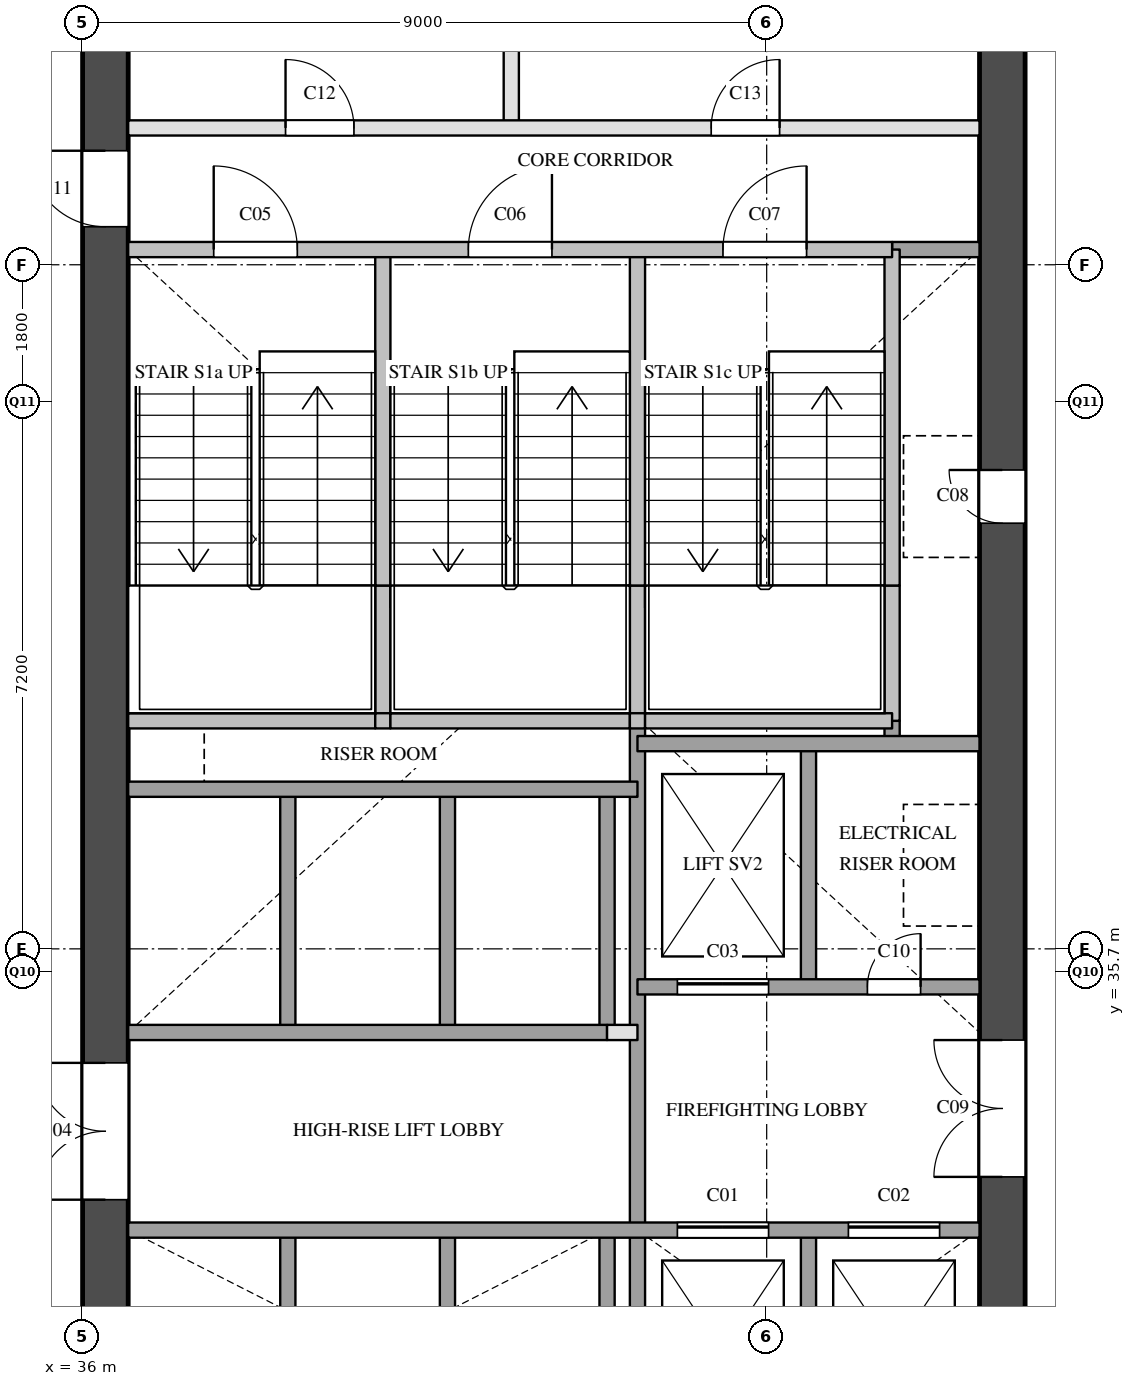
"""IFC4 building model, lengths in metres.
Left out: names, types, materials, properties, quantities, classifications, styles, units other than length and angle.
Written with IfcOpenShell. Run it as: python <this file> out.ifc"""

import sys

from ifc_helpers import new_model, si_unit, direction, frame, frame_2d, origin, place, context, subcontext, project, spatial, rectangle, extrude, element, fill, save


model = new_model("IFC4")
c1 = context("Model", 3, precision=1e-05, world=origin(), true_north=direction((0.0, 1.0)))
c2 = subcontext(c1, "Body", "Model", "MODEL_VIEW")
j1 = project(units=[si_unit("LENGTHUNIT", "METRE"), si_unit("PLANEANGLEUNIT", "RADIAN")], contexts=[c1])
p1 = place(None, origin())
s1 = spatial("IfcSite", under=j1, at=p1, CompositionType="ELEMENT")
p2 = place(p1, origin())
s2 = spatial("IfcBuilding", under=s1, at=p2, CompositionType="ELEMENT")
p3 = place(p2, frame((0.0, 0.0, 65.2)))
s3 = spatial("IfcBuildingStorey", under=s2, at=p3, CompositionType="ELEMENT", Elevation=65.2)
p4 = place(p3, frame((36.3, 29.1, 0.0), z_axis=(0.0, 0.0, 1.0), x_axis=(0.0, 1.0, 0.0)))
e1 = element("IfcWall", 1, at=p4, inside=s3, PredefinedType="SHEAR", context=c2, shape_type="SweptSolid", body=[
    extrude(rectangle(XDim=20.3, YDim=0.6, at=frame_2d((10.15, 0.0))), origin(), (0.0, 0.0, 1.0), 3.5),
])
p5 = place(p4, frame((3.6, 0.0, 0.0)))
e2 = element("IfcOpeningElement", 2, at=p5, cuts=e1, PredefinedType="OPENING", context=c2, shape_type="SweptSolid", body=[
    extrude(rectangle(XDim=1.8, YDim=2.1, at=frame_2d((0.9, 1.05))), frame((0.0, 0.31, 0.0), z_axis=(0.0, -1.0, 0.0), x_axis=(1.0, 0.0, 0.0)), (0.0, 0.0, 1.0), 0.62),
])
p6 = place(p4, frame((16.4, 0.0, 0.0)))
e3 = element("IfcOpeningElement", 3, at=p6, cuts=e1, PredefinedType="OPENING", context=c2, shape_type="SweptSolid", body=[
    extrude(rectangle(XDim=1.0, YDim=2.1, at=frame_2d((0.5, 1.05))), frame((0.0, 0.31, 0.0), z_axis=(0.0, -1.0, 0.0), x_axis=(1.0, 0.0, 0.0)), (0.0, 0.0, 1.0), 0.62),
])
p7 = place(p3, frame((48.1, 29.1, 0.0), z_axis=(0.0, 0.0, 1.0), x_axis=(0.0, 1.0, 0.0)))
e4 = element("IfcWall", 4, at=p7, inside=s3, PredefinedType="SHEAR", context=c2, shape_type="SweptSolid", body=[
    extrude(rectangle(XDim=20.3, YDim=0.6, at=frame_2d((10.15, 0.0))), origin(), (0.0, 0.0, 1.0), 3.5),
])
p8 = place(p7, frame((12.5, 0.0, 0.0)))
e5 = element("IfcOpeningElement", 5, at=p8, cuts=e4, PredefinedType="OPENING", context=c2, shape_type="SweptSolid", body=[
    extrude(rectangle(XDim=0.7, YDim=2.1, at=frame_2d((0.35, 1.05))), frame((0.0, 0.31, 0.0), z_axis=(0.0, -1.0, 0.0), x_axis=(1.0, 0.0, 0.0)), (0.0, 0.0, 1.0), 0.62),
])
p9 = place(p7, frame((3.9, 0.0, 0.0)))
e6 = element("IfcOpeningElement", 6, at=p9, cuts=e4, PredefinedType="OPENING", context=c2, shape_type="SweptSolid", body=[
    extrude(rectangle(XDim=1.8, YDim=2.1, at=frame_2d((0.9, 1.05))), frame((0.0, 0.31, 0.0), z_axis=(0.0, -1.0, 0.0), x_axis=(1.0, 0.0, 0.0)), (0.0, 0.0, 1.0), 0.62),
])
p10 = place(p3, frame((38.7, 29.1, 0.0), z_axis=(0.0, 0.0, 1.0), x_axis=(0.0, 1.0, 0.0)))
e7 = element("IfcWall", 7, at=p10, inside=s3, PredefinedType="SOLIDWALL", context=c2, shape_type="SweptSolid", body=[
    extrude(rectangle(XDim=3.2, YDim=0.2, at=frame_2d((1.6, 0.0))), origin(), (0.0, 0.0, 1.0), 3.5),
])
p11 = place(p3, frame((38.7, 34.9, 0.0), z_axis=(0.0, 0.0, 1.0), x_axis=(0.0, 1.0, 0.0)))
e8 = element("IfcWall", 8, at=p11, inside=s3, PredefinedType="SOLIDWALL", context=c2, shape_type="SweptSolid", body=[
    extrude(rectangle(XDim=3.2, YDim=0.2, at=frame_2d((1.6, 0.0))), origin(), (0.0, 0.0, 1.0), 3.5),
])
p12 = place(p3, frame((39.95, 39.0, 0.0), z_axis=(0.0, 0.0, 1.0), x_axis=(0.0, 1.0, 0.0)))
e9 = element("IfcWall", 9, at=p12, inside=s3, PredefinedType="SOLIDWALL", context=c2, shape_type="SweptSolid", body=[
    extrude(rectangle(XDim=1.78, YDim=0.2, at=frame_2d((0.89, 0.0))), origin(), (0.0, 0.0, 1.0), 3.5),
])
p13 = place(p3, frame((39.95, 40.78, 0.0), z_axis=(0.0, 0.0, 1.0), x_axis=(0.0, 1.0, 0.0)))
e10 = element("IfcWall", 10, at=p13, inside=s3, PredefinedType="SOLIDWALL", context=c2, shape_type="SweptSolid", body=[
    extrude(rectangle(XDim=4.42, YDim=0.2, at=frame_2d((2.21, 0.0))), origin(), (0.0, 0.0, 1.0), 3.5),
])
p14 = place(p3, frame((40.8, 29.1, 0.0), z_axis=(0.0, 0.0, 1.0), x_axis=(0.0, 1.0, 0.0)))
e11 = element("IfcWall", 11, at=p14, inside=s3, PredefinedType="SOLIDWALL", context=c2, shape_type="SweptSolid", body=[
    extrude(rectangle(XDim=3.2, YDim=0.2, at=frame_2d((1.6, 0.0))), origin(), (0.0, 0.0, 1.0), 3.5),
])
p15 = place(p3, frame((40.8, 34.9, 0.0), z_axis=(0.0, 0.0, 1.0), x_axis=(0.0, 1.0, 0.0)))
e12 = element("IfcWall", 12, at=p15, inside=s3, PredefinedType="SOLIDWALL", context=c2, shape_type="SweptSolid", body=[
    extrude(rectangle(XDim=3.2, YDim=0.2, at=frame_2d((1.6, 0.0))), origin(), (0.0, 0.0, 1.0), 3.5),
])
p16 = place(p3, frame((41.64, 46.8, 0.0), z_axis=(0.0, 0.0, 1.0), x_axis=(0.0, 1.0, 0.0)))
e13 = element("IfcWall", 13, at=p16, inside=s3, PredefinedType="PARTITIONING", context=c2, shape_type="SweptSolid", body=[
    extrude(rectangle(XDim=2.2, YDim=0.2, at=frame_2d((1.1, 0.0))), origin(), (0.0, 0.0, 1.0), 3.5),
])
p17 = place(p3, frame((42.9, 29.1, 0.0), z_axis=(0.0, 0.0, 1.0), x_axis=(0.0, 1.0, 0.0)))
e14 = element("IfcWall", 14, at=p17, inside=s3, PredefinedType="SOLIDWALL", context=c2, shape_type="SweptSolid", body=[
    extrude(rectangle(XDim=3.2, YDim=0.2, at=frame_2d((1.6, 0.0))), origin(), (0.0, 0.0, 1.0), 3.5),
])
p18 = place(p3, frame((42.9, 34.9, 0.0), z_axis=(0.0, 0.0, 1.0), x_axis=(0.0, 1.0, 0.0)))
e15 = element("IfcWall", 15, at=p18, inside=s3, PredefinedType="SOLIDWALL", context=c2, shape_type="SweptSolid", body=[
    extrude(rectangle(XDim=3.2, YDim=0.2, at=frame_2d((1.6, 0.0))), origin(), (0.0, 0.0, 1.0), 3.5),
])
p19 = place(p3, frame((43.3, 29.1, 0.0), z_axis=(0.0, 0.0, 1.0), x_axis=(0.0, 1.0, 0.0)))
e16 = element("IfcWall", 16, at=p19, inside=s3, PredefinedType="SOLIDWALL", context=c2, shape_type="SweptSolid", body=[
    extrude(rectangle(XDim=9.9, YDim=0.2, at=frame_2d((4.95, 0.0))), origin(), (0.0, 0.0, 1.0), 3.5),
])
p20 = place(p3, frame((43.3, 39.0, 0.0), z_axis=(0.0, 0.0, 1.0), x_axis=(0.0, 1.0, 0.0)))
e17 = element("IfcWall", 17, at=p20, inside=s3, PredefinedType="SOLIDWALL", context=c2, shape_type="SweptSolid", body=[
    extrude(rectangle(XDim=1.78, YDim=0.2, at=frame_2d((0.89, 0.0))), origin(), (0.0, 0.0, 1.0), 3.5),
])
p21 = place(p3, frame((43.3, 40.78, 0.0), z_axis=(0.0, 0.0, 1.0), x_axis=(0.0, 1.0, 0.0)))
e18 = element("IfcWall", 18, at=p21, inside=s3, PredefinedType="SOLIDWALL", context=c2, shape_type="SweptSolid", body=[
    extrude(rectangle(XDim=4.42, YDim=0.2, at=frame_2d((2.21, 0.0))), origin(), (0.0, 0.0, 1.0), 3.5),
])
for number, where, z_axis, x_axis in (
    (19, (45.55, 29.1, 0.0), (0.0, 0.0, 1.0), (0.0, 1.0, 0.0)),
    (20, (45.55, 35.5, 0.0), (0.0, 0.0, 1.0), (0.0, 1.0, 0.0)),
):
    element("IfcWall", number, at=place(p3, frame(where, z_axis=z_axis, x_axis=x_axis)), inside=s3, PredefinedType="SOLIDWALL", context=c2, shape_type="SweptSolid", body=[
        extrude(rectangle(XDim=3.2, YDim=0.2, at=frame_2d((1.6, 0.0))), origin(), (0.0, 0.0, 1.0), 3.5),
    ])
p22 = place(p3, frame((46.65, 38.7, 0.0), z_axis=(0.0, 0.0, 1.0), x_axis=(0.0, 1.0, 0.0)))
e21 = element("IfcWall", 21, at=p22, inside=s3, PredefinedType="SOLIDWALL", context=c2, shape_type="SweptSolid", body=[
    extrude(rectangle(XDim=0.3, YDim=0.2, at=frame_2d((0.15, 0.0))), origin(), (0.0, 0.0, 1.0), 3.5),
])
p23 = place(p3, frame((46.65, 39.0, 0.0), z_axis=(0.0, 0.0, 1.0), x_axis=(0.0, 1.0, 0.0)))
e22 = element("IfcWall", 22, at=p23, inside=s3, PredefinedType="SOLIDWALL", context=c2, shape_type="SweptSolid", body=[
    extrude(rectangle(XDim=1.78, YDim=0.2, at=frame_2d((0.89, 0.0))), origin(), (0.0, 0.0, 1.0), 3.5),
])
p24 = place(p3, frame((46.65, 40.78, 0.0), z_axis=(0.0, 0.0, 1.0), x_axis=(0.0, 1.0, 0.0)))
e23 = element("IfcWall", 23, at=p24, inside=s3, PredefinedType="SOLIDWALL", context=c2, shape_type="SweptSolid", body=[
    extrude(rectangle(XDim=4.42, YDim=0.2, at=frame_2d((2.21, 0.0))), origin(), (0.0, 0.0, 1.0), 3.5),
])
p25 = place(p3, frame((36.6, 32.3, 0.0), z_axis=(0.0, 0.0, 1.0), x_axis=(1.0, 0.0, 0.0)))
e24 = element("IfcWall", 24, at=p25, inside=s3, PredefinedType="SOLIDWALL", context=c2, shape_type="SweptSolid", body=[
    extrude(rectangle(XDim=11.2, YDim=0.2, at=frame_2d((5.6, 0.0))), origin(), (0.0, 0.0, 1.0), 3.5),
])
p26 = place(p25, frame((7.225, 0.0, 0.0)))
e25 = element("IfcOpeningElement", 25, at=p26, cuts=e24, PredefinedType="OPENING", context=c2, shape_type="SweptSolid", body=[
    extrude(rectangle(XDim=1.2, YDim=2.1, at=frame_2d((0.6, 1.05))), frame((0.0, 0.11, 0.0), z_axis=(0.0, -1.0, 0.0), x_axis=(1.0, 0.0, 0.0)), (0.0, 0.0, 1.0), 0.22),
])
p27 = place(p25, frame((9.475, 0.0, 0.0)))
e26 = element("IfcOpeningElement", 26, at=p27, cuts=e24, PredefinedType="OPENING", context=c2, shape_type="SweptSolid", body=[
    extrude(rectangle(XDim=1.2, YDim=2.1, at=frame_2d((0.6, 1.05))), frame((0.0, 0.11, 0.0), z_axis=(0.0, -1.0, 0.0), x_axis=(1.0, 0.0, 0.0)), (0.0, 0.0, 1.0), 0.22),
])
p28 = place(p3, frame((42.9, 34.9, 0.0), z_axis=(0.0, 0.0, 1.0), x_axis=(1.0, 0.0, 0.0)))
e27 = element("IfcWall", 27, at=p28, inside=s3, PredefinedType="PARTITIONING", context=c2, shape_type="SweptSolid", body=[
    extrude(rectangle(XDim=0.4, YDim=0.2, at=frame_2d((0.2, 0.0))), origin(), (0.0, 0.0, 1.0), 3.5),
])
p29 = place(p3, frame((36.6, 34.9, 0.0), z_axis=(0.0, 0.0, 1.0), x_axis=(1.0, 0.0, 0.0)))
e28 = element("IfcWall", 28, at=p29, inside=s3, PredefinedType="SOLIDWALL", context=c2, shape_type="SweptSolid", body=[
    extrude(rectangle(XDim=6.3, YDim=0.2, at=frame_2d((3.15, 0.0))), origin(), (0.0, 0.0, 1.0), 3.5),
])
p30 = place(p3, frame((43.3, 35.5, 0.0), z_axis=(0.0, 0.0, 1.0), x_axis=(1.0, 0.0, 0.0)))
e29 = element("IfcWall", 29, at=p30, inside=s3, PredefinedType="SOLIDWALL", context=c2, shape_type="SweptSolid", body=[
    extrude(rectangle(XDim=4.5, YDim=0.2, at=frame_2d((2.25, 0.0))), origin(), (0.0, 0.0, 1.0), 3.5),
])
p31 = place(p30, frame((0.525, 0.0, 0.0)))
e30 = element("IfcOpeningElement", 30, at=p31, cuts=e29, PredefinedType="OPENING", context=c2, shape_type="SweptSolid", body=[
    extrude(rectangle(XDim=1.2, YDim=2.1, at=frame_2d((0.6, 1.05))), frame((0.0, 0.11, 0.0), z_axis=(0.0, -1.0, 0.0), x_axis=(1.0, 0.0, 0.0)), (0.0, 0.0, 1.0), 0.22),
])
p32 = place(p30, frame((3.025, 0.0, 0.0)))
e31 = element("IfcOpeningElement", 31, at=p32, cuts=e29, PredefinedType="OPENING", context=c2, shape_type="SweptSolid", body=[
    extrude(rectangle(XDim=0.7, YDim=2.1, at=frame_2d((0.35, 1.05))), frame((0.0, 0.11, 0.0), z_axis=(0.0, -1.0, 0.0), x_axis=(1.0, 0.0, 0.0)), (0.0, 0.0, 1.0), 0.22),
])
p33 = place(p3, frame((36.6, 38.1, 0.0), z_axis=(0.0, 0.0, 1.0), x_axis=(1.0, 0.0, 0.0)))
e32 = element("IfcWall", 32, at=p33, inside=s3, PredefinedType="SOLIDWALL", context=c2, shape_type="SweptSolid", body=[
    extrude(rectangle(XDim=6.7, YDim=0.2, at=frame_2d((3.35, 0.0))), origin(), (0.0, 0.0, 1.0), 3.5),
])
p34 = place(p3, frame((43.3, 38.7, 0.0), z_axis=(0.0, 0.0, 1.0), x_axis=(1.0, 0.0, 0.0)))
e33 = element("IfcWall", 33, at=p34, inside=s3, PredefinedType="SOLIDWALL", context=c2, shape_type="SweptSolid", body=[
    extrude(rectangle(XDim=4.5, YDim=0.2, at=frame_2d((2.25, 0.0))), origin(), (0.0, 0.0, 1.0), 3.5),
])
p35 = place(p3, frame((36.6, 39.0, 0.0), z_axis=(0.0, 0.0, 1.0), x_axis=(1.0, 0.0, 0.0)))
e34 = element("IfcWall", 34, at=p35, inside=s3, PredefinedType="SOLIDWALL", context=c2, shape_type="SweptSolid", body=[
    extrude(rectangle(XDim=3.25, YDim=0.2, at=frame_2d((1.625, 0.0))), origin(), (0.0, 0.0, 1.0), 3.5),
])
p36 = place(p3, frame((39.85, 39.0, 0.0), z_axis=(0.0, 0.0, 1.0), x_axis=(1.0, 0.0, 0.0)))
e35 = element("IfcWall", 35, at=p36, inside=s3, PredefinedType="SOLIDWALL", context=c2, shape_type="SweptSolid", body=[
    extrude(rectangle(XDim=0.2, YDim=0.2, at=frame_2d((0.1, 0.0))), origin(), (0.0, 0.0, 1.0), 3.5),
])
p37 = place(p3, frame((40.05, 39.0, 0.0), z_axis=(0.0, 0.0, 1.0), x_axis=(1.0, 0.0, 0.0)))
e36 = element("IfcWall", 36, at=p37, inside=s3, PredefinedType="SOLIDWALL", context=c2, shape_type="SweptSolid", body=[
    extrude(rectangle(XDim=3.15, YDim=0.2, at=frame_2d((1.575, 0.0))), origin(), (0.0, 0.0, 1.0), 3.5),
])
p38 = place(p3, frame((43.2, 39.0, 0.0), z_axis=(0.0, 0.0, 1.0), x_axis=(1.0, 0.0, 0.0)))
e37 = element("IfcWall", 37, at=p38, inside=s3, PredefinedType="SOLIDWALL", context=c2, shape_type="SweptSolid", body=[
    extrude(rectangle(XDim=0.2, YDim=0.2, at=frame_2d((0.1, 0.0))), origin(), (0.0, 0.0, 1.0), 3.5),
])
p39 = place(p3, frame((43.4, 39.0, 0.0), z_axis=(0.0, 0.0, 1.0), x_axis=(1.0, 0.0, 0.0)))
e38 = element("IfcWall", 38, at=p39, inside=s3, PredefinedType="SOLIDWALL", context=c2, shape_type="SweptSolid", body=[
    extrude(rectangle(XDim=3.25, YDim=0.2, at=frame_2d((1.625, 0.0))), origin(), (0.0, 0.0, 1.0), 3.5),
])
p40 = place(p3, frame((46.65, 45.2, 0.0), z_axis=(0.0, 0.0, 1.0), x_axis=(1.0, 0.0, 0.0)))
e39 = element("IfcWall", 39, at=p40, inside=s3, PredefinedType="SOLIDWALL", context=c2, shape_type="SweptSolid", body=[
    extrude(rectangle(XDim=1.15, YDim=0.2, at=frame_2d((0.575, 0.0))), origin(), (0.0, 0.0, 1.0), 3.5),
])
p41 = place(p3, frame((36.6, 45.2, 0.0), z_axis=(0.0, 0.0, 1.0), x_axis=(1.0, 0.0, 0.0)))
e40 = element("IfcWall", 40, at=p41, inside=s3, PredefinedType="SOLIDWALL", context=c2, shape_type="SweptSolid", body=[
    extrude(rectangle(XDim=10.05, YDim=0.2, at=frame_2d((5.025, 0.0))), origin(), (0.0, 0.0, 1.0), 3.5),
])
p42 = place(p41, frame((1.125, 0.0, 0.0)))
e41 = element("IfcOpeningElement", 41, at=p42, cuts=e40, PredefinedType="OPENING", context=c2, shape_type="SweptSolid", body=[
    extrude(rectangle(XDim=1.1, YDim=2.1, at=frame_2d((0.55, 1.05))), frame((0.0, 0.11, 0.0), z_axis=(0.0, -1.0, 0.0), x_axis=(1.0, 0.0, 0.0)), (0.0, 0.0, 1.0), 0.22),
])
p43 = place(p41, frame((4.475, 0.0, 0.0)))
e42 = element("IfcOpeningElement", 42, at=p43, cuts=e40, PredefinedType="OPENING", context=c2, shape_type="SweptSolid", body=[
    extrude(rectangle(XDim=1.1, YDim=2.1, at=frame_2d((0.55, 1.05))), frame((0.0, 0.11, 0.0), z_axis=(0.0, -1.0, 0.0), x_axis=(1.0, 0.0, 0.0)), (0.0, 0.0, 1.0), 0.22),
])
p44 = place(p41, frame((7.825, 0.0, 0.0)))
e43 = element("IfcOpeningElement", 43, at=p44, cuts=e40, PredefinedType="OPENING", context=c2, shape_type="SweptSolid", body=[
    extrude(rectangle(XDim=1.1, YDim=2.1, at=frame_2d((0.55, 1.05))), frame((0.0, 0.11, 0.0), z_axis=(0.0, -1.0, 0.0), x_axis=(1.0, 0.0, 0.0)), (0.0, 0.0, 1.0), 0.22),
])
p45 = place(p3, frame((36.6, 46.8, 0.0), z_axis=(0.0, 0.0, 1.0), x_axis=(1.0, 0.0, 0.0)))
e44 = element("IfcWall", 44, at=p45, inside=s3, PredefinedType="PARTITIONING", context=c2, shape_type="SweptSolid", body=[
    extrude(rectangle(XDim=11.2, YDim=0.2, at=frame_2d((5.6, 0.0))), origin(), (0.0, 0.0, 1.0), 3.5),
])
p46 = place(p45, frame((2.07, 0.0, 0.0)))
e45 = element("IfcOpeningElement", 45, at=p46, cuts=e44, PredefinedType="OPENING", context=c2, shape_type="SweptSolid", body=[
    extrude(rectangle(XDim=0.9, YDim=2.1, at=frame_2d((0.45, 1.05))), frame((0.0, 0.11, 0.0), z_axis=(0.0, -1.0, 0.0), x_axis=(1.0, 0.0, 0.0)), (0.0, 0.0, 1.0), 0.22),
])
p47 = place(p45, frame((7.67, 0.0, 0.0)))
e46 = element("IfcOpeningElement", 46, at=p47, cuts=e44, PredefinedType="OPENING", context=c2, shape_type="SweptSolid", body=[
    extrude(rectangle(XDim=0.9, YDim=2.1, at=frame_2d((0.45, 1.05))), frame((0.0, 0.11, 0.0), z_axis=(0.0, -1.0, 0.0), x_axis=(1.0, 0.0, 0.0)), (0.0, 0.0, 1.0), 0.22),
])
p48 = place(p26, origin())
e47 = element("IfcDoor", 47, at=p48, inside=s3, OperationType="SLIDING_TO_LEFT", PredefinedType="DOOR", context=c2, shape_type="SweptSolid", body=[
    extrude(rectangle(XDim=1.2, YDim=2.1, at=frame_2d((0.6, 1.05))), frame((0.0, 0.025, 0.0), z_axis=(0.0, -1.0, 0.0), x_axis=(1.0, 0.0, 0.0)), (0.0, 0.0, 1.0), 0.05),
])
fill(e25, e47)
p49 = place(p27, origin())
e48 = element("IfcDoor", 48, at=p49, inside=s3, OperationType="SLIDING_TO_LEFT", PredefinedType="DOOR", context=c2, shape_type="SweptSolid", body=[
    extrude(rectangle(XDim=1.2, YDim=2.1, at=frame_2d((0.6, 1.05))), frame((0.0, 0.025, 0.0), z_axis=(0.0, -1.0, 0.0), x_axis=(1.0, 0.0, 0.0)), (0.0, 0.0, 1.0), 0.05),
])
fill(e26, e48)
p50 = place(p31, origin())
e49 = element("IfcDoor", 49, at=p50, inside=s3, OperationType="SLIDING_TO_LEFT", PredefinedType="DOOR", context=c2, shape_type="SweptSolid", body=[
    extrude(rectangle(XDim=1.2, YDim=2.1, at=frame_2d((0.6, 1.05))), frame((0.0, 0.025, 0.0), z_axis=(0.0, -1.0, 0.0), x_axis=(1.0, 0.0, 0.0)), (0.0, 0.0, 1.0), 0.05),
])
fill(e30, e49)
p51 = place(p5, origin())
e50 = element("IfcDoor", 50, at=p51, inside=s3, OperationType="DOUBLE_DOOR_SINGLE_SWING", PredefinedType="DOOR", context=c2, shape_type="SweptSolid", body=[
    extrude(rectangle(XDim=1.8, YDim=2.1, at=frame_2d((0.9, 1.05))), frame((0.0, 0.025, 0.0), z_axis=(0.0, -1.0, 0.0), x_axis=(1.0, 0.0, 0.0)), (0.0, 0.0, 1.0), 0.05),
])
fill(e2, e50)
p52 = place(p42, origin())
e51 = element("IfcDoor", 51, at=p52, inside=s3, OperationType="SINGLE_SWING_LEFT", PredefinedType="DOOR", context=c2, shape_type="SweptSolid", body=[
    extrude(rectangle(XDim=1.1, YDim=2.1, at=frame_2d((0.55, 1.05))), frame((0.0, 0.025, 0.0), z_axis=(0.0, -1.0, 0.0), x_axis=(1.0, 0.0, 0.0)), (0.0, 0.0, 1.0), 0.05),
])
fill(e41, e51)
p53 = place(p43, origin())
e52 = element("IfcDoor", 52, at=p53, inside=s3, OperationType="SINGLE_SWING_RIGHT", PredefinedType="DOOR", context=c2, shape_type="SweptSolid", body=[
    extrude(rectangle(XDim=1.1, YDim=2.1, at=frame_2d((0.55, 1.05))), frame((0.0, 0.025, 0.0), z_axis=(0.0, -1.0, 0.0), x_axis=(1.0, 0.0, 0.0)), (0.0, 0.0, 1.0), 0.05),
])
fill(e42, e52)
p54 = place(p44, origin())
e53 = element("IfcDoor", 53, at=p54, inside=s3, OperationType="SINGLE_SWING_RIGHT", PredefinedType="DOOR", context=c2, shape_type="SweptSolid", body=[
    extrude(rectangle(XDim=1.1, YDim=2.1, at=frame_2d((0.55, 1.05))), frame((0.0, 0.025, 0.0), z_axis=(0.0, -1.0, 0.0), x_axis=(1.0, 0.0, 0.0)), (0.0, 0.0, 1.0), 0.05),
])
fill(e43, e53)
p55 = place(p8, origin())
e54 = element("IfcDoor", 54, at=p55, inside=s3, OperationType="SINGLE_SWING_RIGHT", PredefinedType="DOOR", context=c2, shape_type="SweptSolid", body=[
    extrude(rectangle(XDim=0.7, YDim=2.1, at=frame_2d((0.35, 1.05))), frame((0.0, 0.025, 0.0), z_axis=(0.0, -1.0, 0.0), x_axis=(1.0, 0.0, 0.0)), (0.0, 0.0, 1.0), 0.05),
])
fill(e5, e54)
p56 = place(p9, origin())
e55 = element("IfcDoor", 55, at=p56, inside=s3, OperationType="DOUBLE_DOOR_SINGLE_SWING", PredefinedType="DOOR", context=c2, shape_type="SweptSolid", body=[
    extrude(rectangle(XDim=1.8, YDim=2.1, at=frame_2d((0.9, 1.05))), frame((0.0, 0.025, 0.0), z_axis=(0.0, -1.0, 0.0), x_axis=(1.0, 0.0, 0.0)), (0.0, 0.0, 1.0), 0.05),
])
fill(e6, e55)
p57 = place(p32, origin())
e56 = element("IfcDoor", 56, at=p57, inside=s3, OperationType="SINGLE_SWING_RIGHT", PredefinedType="DOOR", context=c2, shape_type="SweptSolid", body=[
    extrude(rectangle(XDim=0.7, YDim=2.1, at=frame_2d((0.35, 1.05))), frame((0.0, 0.025, 0.0), z_axis=(0.0, -1.0, 0.0), x_axis=(1.0, 0.0, 0.0)), (0.0, 0.0, 1.0), 0.05),
])
fill(e31, e56)
p58 = place(p6, origin())
e57 = element("IfcDoor", 57, at=p58, inside=s3, OperationType="SINGLE_SWING_RIGHT", PredefinedType="DOOR", context=c2, shape_type="SweptSolid", body=[
    extrude(rectangle(XDim=1.0, YDim=2.1, at=frame_2d((0.5, 1.05))), frame((0.0, 0.025, 0.0), z_axis=(0.0, -1.0, 0.0), x_axis=(1.0, 0.0, 0.0)), (0.0, 0.0, 1.0), 0.05),
])
fill(e3, e57)
p59 = place(p46, origin())
e58 = element("IfcDoor", 58, at=p59, inside=s3, OperationType="SINGLE_SWING_LEFT", PredefinedType="DOOR", context=c2, shape_type="SweptSolid", body=[
    extrude(rectangle(XDim=0.9, YDim=2.1, at=frame_2d((0.45, 1.05))), frame((0.0, 0.025, 0.0), z_axis=(0.0, -1.0, 0.0), x_axis=(1.0, 0.0, 0.0)), (0.0, 0.0, 1.0), 0.05),
])
fill(e45, e58)
p60 = place(p47, origin())
e59 = element("IfcDoor", 59, at=p60, inside=s3, OperationType="SINGLE_SWING_RIGHT", PredefinedType="DOOR", context=c2, shape_type="SweptSolid", body=[
    extrude(rectangle(XDim=0.9, YDim=2.1, at=frame_2d((0.45, 1.05))), frame((0.0, 0.025, 0.0), z_axis=(0.0, -1.0, 0.0), x_axis=(1.0, 0.0, 0.0)), (0.0, 0.0, 1.0), 0.05),
])
fill(e46, e59)
save(model, sys.argv[1])
